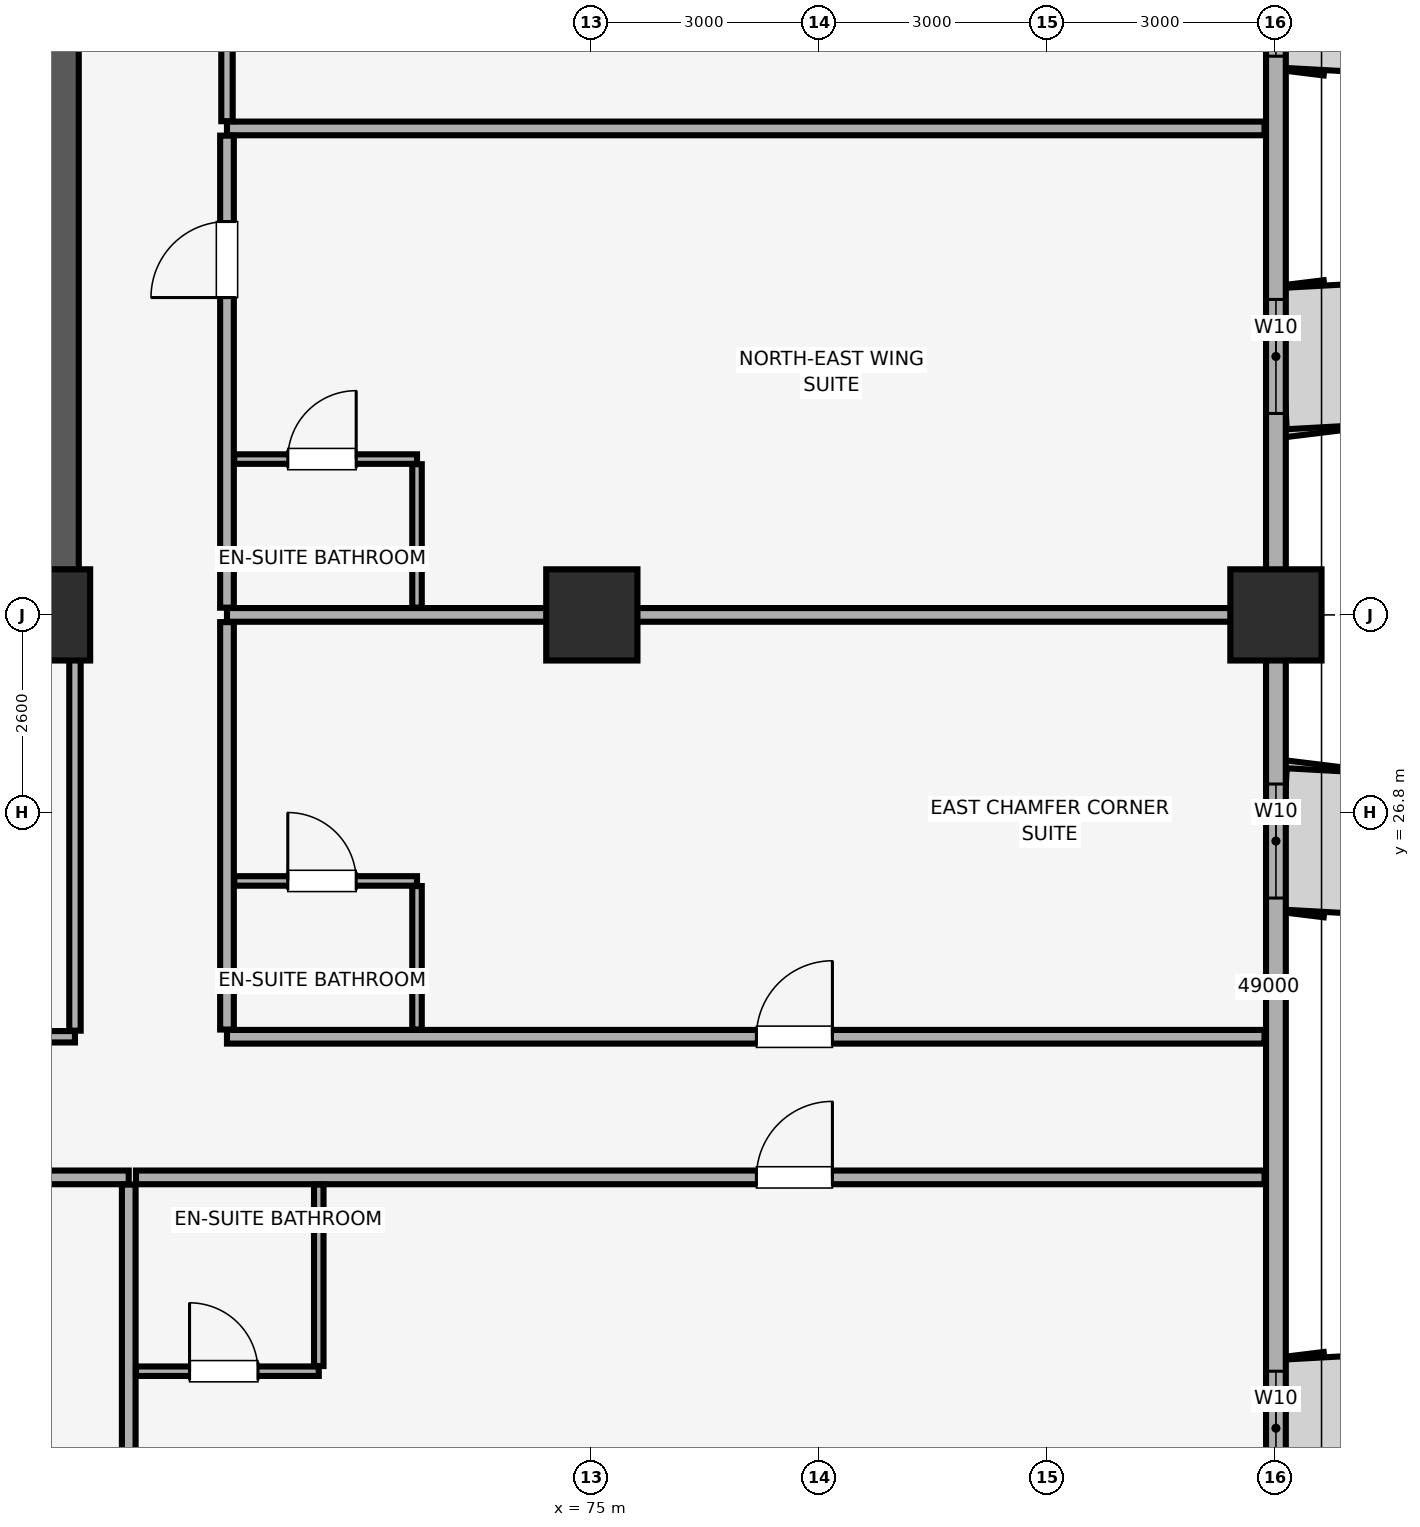
"""IFC4 building model, lengths in metres.
Left out: names, types, materials, properties, quantities, classifications, styles, units other than length and angle.
Written with IfcOpenShell. Run it as: python <this file> out.ifc"""

import sys

from ifc_helpers import new_model, si_unit, direction, frame, frame_2d, origin, origin_2d, place, context, subcontext, project, spatial, rectangle, extrude, element, fill, save


model = new_model("IFC4")
c1 = context("Model", 3, precision=1e-05, world=origin(), true_north=direction((0.0, 1.0)))
c2 = subcontext(c1, "Body", "Model", "MODEL_VIEW")
j1 = project(units=[si_unit("LENGTHUNIT", "METRE"), si_unit("PLANEANGLEUNIT", "RADIAN")], contexts=[c1])
p1 = place(None, origin())
s1 = spatial("IfcSite", under=j1, at=p1, CompositionType="ELEMENT")
p2 = place(p1, origin())
s2 = spatial("IfcBuilding", under=s1, at=p2, CompositionType="ELEMENT")
p3 = place(p2, frame((0.0, 0.0, 104.3)))
s3 = spatial("IfcBuildingStorey", under=s2, at=p3, CompositionType="ELEMENT", Elevation=104.3)
for number, where, z_axis, x_axis in (
    (1, (84.0, 29.4, 0.0), (0.0, 0.0, 1.0), (1.0, 0.0, 0.0)),
    (2, (67.8, 29.4, 0.0), (0.0, 0.0, 1.0), (1.0, 0.0, 0.0)),
    (3, (75.0, 29.4, 0.0), (0.0, 0.0, 1.0), (1.0, 0.0, 0.0)),
):
    element("IfcColumn", number, at=place(p3, frame(where, z_axis=z_axis, x_axis=x_axis)), inside=s3, PredefinedType="COLUMN", context=c2, shape_type="SweptSolid", body=[
        extrude(rectangle(XDim=1.2, YDim=1.2, at=origin_2d()), origin(), (0.0, 0.0, 1.0), 3.51),
    ])
p4 = place(p3, frame((84.0, 4.2, 0.0), z_axis=(0.0, 0.0, 1.0), x_axis=(0.0, 1.0, 0.0)))
e4 = element("IfcWall", 4, at=p4, inside=s3, PredefinedType="SOLIDWALL", context=c2, shape_type="SweptSolid", body=[
    extrude(rectangle(XDim=40.6, YDim=0.26, at=frame_2d((20.3, 0.0))), origin(), (0.0, 0.0, 1.0), 2.56),
])
p5 = place(p4, frame((6.05, 0.0, 0.85)))
e5 = element("IfcOpeningElement", 5, at=p5, cuts=e4, PredefinedType="OPENING", context=c2, shape_type="SweptSolid", body=[
    extrude(rectangle(XDim=1.5, YDim=1.4, at=frame_2d((0.75, 0.7))), frame((0.0, 0.14, 0.0), z_axis=(0.0, -1.0, 0.0), x_axis=(1.0, 0.0, 0.0)), (0.0, 0.0, 1.0), 0.28),
])
p6 = place(p4, frame((13.75, 0.0, 0.85)))
e6 = element("IfcOpeningElement", 6, at=p6, cuts=e4, PredefinedType="OPENING", context=c2, shape_type="SweptSolid", body=[
    extrude(rectangle(XDim=1.5, YDim=1.4, at=frame_2d((0.75, 0.7))), frame((0.0, 0.14, 0.0), z_axis=(0.0, -1.0, 0.0), x_axis=(1.0, 0.0, 0.0)), (0.0, 0.0, 1.0), 0.28),
])
p7 = place(p4, frame((21.475, 0.0, 0.85)))
e7 = element("IfcOpeningElement", 7, at=p7, cuts=e4, PredefinedType="OPENING", context=c2, shape_type="SweptSolid", body=[
    extrude(rectangle(XDim=1.5, YDim=1.4, at=frame_2d((0.75, 0.7))), frame((0.0, 0.14, 0.0), z_axis=(0.0, -1.0, 0.0), x_axis=(1.0, 0.0, 0.0)), (0.0, 0.0, 1.0), 0.28),
])
p8 = place(p4, frame((27.85, 0.0, 0.85)))
e8 = element("IfcOpeningElement", 8, at=p8, cuts=e4, PredefinedType="OPENING", context=c2, shape_type="SweptSolid", body=[
    extrude(rectangle(XDim=1.5, YDim=1.4, at=frame_2d((0.75, 0.7))), frame((0.0, 0.14, 0.0), z_axis=(0.0, -1.0, 0.0), x_axis=(1.0, 0.0, 0.0)), (0.0, 0.0, 1.0), 0.28),
])
p9 = place(p4, frame((32.55, 0.0, 0.85)))
e9 = element("IfcOpeningElement", 9, at=p9, cuts=e4, PredefinedType="OPENING", context=c2, shape_type="SweptSolid", body=[
    extrude(rectangle(XDim=1.5, YDim=1.4, at=frame_2d((0.75, 0.7))), frame((0.0, 0.14, 0.0), z_axis=(0.0, -1.0, 0.0), x_axis=(1.0, 0.0, 0.0)), (0.0, 0.0, 1.0), 0.28),
])
p10 = place(p4, frame((37.365, 0.0, 0.85)))
e10 = element("IfcOpeningElement", 10, at=p10, cuts=e4, PredefinedType="OPENING", context=c2, shape_type="SweptSolid", body=[
    extrude(rectangle(XDim=1.5, YDim=1.4, at=frame_2d((0.75, 0.7))), frame((0.0, 0.14, 0.0), z_axis=(0.0, -1.0, 0.0), x_axis=(1.0, 0.0, 0.0)), (0.0, 0.0, 1.0), 0.28),
])
p11 = place(p3, frame((67.8, 29.4, 0.0), z_axis=(0.0, 0.0, 1.0), x_axis=(0.0, 1.0, 0.0)))
e11 = element("IfcWall", 11, at=p11, inside=s3, PredefinedType="SHEAR", context=c2, shape_type="SweptSolid", body=[
    extrude(rectangle(XDim=19.2, YDim=0.9, at=frame_2d((9.6, 0.0))), origin(), (0.0, 0.0, 1.0), 3.51),
])
p12 = place(p3, frame((58.26, 22.0, 0.0), z_axis=(0.0, 0.0, 1.0), x_axis=(1.0, 0.0, 0.0)))
e12 = element("IfcWall", 12, at=p12, inside=s3, PredefinedType="PARTITIONING", context=c2, shape_type="SweptSolid", body=[
    extrude(rectangle(XDim=10.648, YDim=0.18, at=frame_2d((5.324, 0.0))), origin(), (0.0, 0.0, 1.0), 3.51),
])
p13 = place(p12, frame((5.533, 0.0, 0.0)))
e13 = element("IfcOpeningElement", 13, at=p13, cuts=e12, PredefinedType="OPENING", context=c2, shape_type="SweptSolid", body=[
    extrude(rectangle(XDim=1.0, YDim=2.15, at=frame_2d((0.5, 1.075))), frame((0.0, 0.1, 0.0), z_axis=(0.0, -1.0, 0.0), x_axis=(1.0, 0.0, 0.0)), (0.0, 0.0, 1.0), 0.2),
])
p14 = place(p3, frame((68.907, 0.15, 0.0), z_axis=(0.0, 0.0, 1.0), x_axis=(0.0, 1.0, 0.0)))
e14 = element("IfcWall", 14, at=p14, inside=s3, PredefinedType="PARTITIONING", context=c2, shape_type="SweptSolid", body=[
    extrude(rectangle(XDim=21.755, YDim=0.18, at=frame_2d((10.877, 0.0))), origin(), (0.0, 0.0, 1.0), 3.51),
])
p15 = place(p3, frame((69.002, 22.0, 0.0), z_axis=(0.0, 0.0, 1.0), x_axis=(1.0, 0.0, 0.0)))
e15 = element("IfcWall", 15, at=p15, inside=s3, PredefinedType="PARTITIONING", context=c2, shape_type="SweptSolid", body=[
    extrude(rectangle(XDim=14.848, YDim=0.18, at=frame_2d((7.424, 0.0))), origin(), (0.0, 0.0, 1.0), 3.51),
])
p16 = place(p15, frame((8.163, 0.0, 0.0)))
e16 = element("IfcOpeningElement", 16, at=p16, cuts=e15, PredefinedType="OPENING", context=c2, shape_type="SweptSolid", body=[
    extrude(rectangle(XDim=1.0, YDim=2.15, at=frame_2d((0.5, 1.075))), frame((0.0, 0.1, 0.0), z_axis=(0.0, -1.0, 0.0), x_axis=(1.0, 0.0, 0.0)), (0.0, 0.0, 1.0), 0.2),
])
p17 = place(p3, frame((69.002, 19.45, 0.0), z_axis=(0.0, 0.0, 1.0), x_axis=(1.0, 0.0, 0.0)))
e17 = element("IfcWall", 17, at=p17, inside=s3, PredefinedType="PARTITIONING", context=c2, shape_type="SweptSolid", body=[
    extrude(rectangle(XDim=2.405, YDim=0.125, at=frame_2d((1.203, 0.0))), origin(), (0.0, 0.0, 1.0), 3.51),
])
p18 = place(p17, frame((0.705, 0.0, 0.0)))
e18 = element("IfcOpeningElement", 18, at=p18, cuts=e17, PredefinedType="OPENING", context=c2, shape_type="SweptSolid", body=[
    extrude(rectangle(XDim=0.9, YDim=2.1, at=frame_2d((0.45, 1.05))), frame((0.0, 0.073, 0.0), z_axis=(0.0, -1.0, 0.0), x_axis=(1.0, 0.0, 0.0)), (0.0, 0.0, 1.0), 0.145),
])
p19 = place(p3, frame((71.407, 19.518, 0.0), z_axis=(0.0, 0.0, 1.0), x_axis=(0.0, 1.0, 0.0)))
e19 = element("IfcWall", 19, at=p19, inside=s3, PredefinedType="PARTITIONING", context=c2, shape_type="SweptSolid", body=[
    extrude(rectangle(XDim=2.387, YDim=0.125, at=frame_2d((1.194, 0.0))), origin(), (0.0, 0.0, 1.0), 2.977),
])
p20 = place(p3, frame((57.88, 23.85, 0.0), z_axis=(0.0, 0.0, 1.0), x_axis=(1.0, 0.0, 0.0)))
e20 = element("IfcWall", 20, at=p20, inside=s3, PredefinedType="PARTITIONING", context=c2, shape_type="SweptSolid", body=[
    extrude(rectangle(XDim=10.32, YDim=0.15, at=frame_2d((5.16, 0.0))), origin(), (0.0, 0.0, 1.0), 3.51),
])
p21 = place(p20, frame((4.62, 0.0, 0.0)))
e21 = element("IfcOpeningElement", 21, at=p21, cuts=e20, PredefinedType="OPENING", context=c2, shape_type="SweptSolid", body=[
    extrude(rectangle(XDim=1.0, YDim=2.15, at=frame_2d((0.5, 1.075))), frame((0.0, 0.085, 0.0), z_axis=(0.0, -1.0, 0.0), x_axis=(1.0, 0.0, 0.0)), (0.0, 0.0, 1.0), 0.17),
])
p22 = place(p3, frame((68.2, 23.93, 0.0), z_axis=(0.0, 0.0, 1.0), x_axis=(0.0, 1.0, 0.0)))
e22 = element("IfcWall", 22, at=p22, inside=s3, PredefinedType="PARTITIONING", context=c2, shape_type="SweptSolid", body=[
    extrude(rectangle(XDim=5.46, YDim=0.15, at=frame_2d((2.73, 0.0))), origin(), (0.0, 0.0, 1.0), 3.51),
])
p23 = place(p3, frame((70.2, 23.85, 0.0), z_axis=(0.0, 0.0, 1.0), x_axis=(1.0, 0.0, 0.0)))
e23 = element("IfcWall", 23, at=p23, inside=s3, PredefinedType="PARTITIONING", context=c2, shape_type="SweptSolid", body=[
    extrude(rectangle(XDim=13.65, YDim=0.18, at=frame_2d((6.825, 0.0))), origin(), (0.0, 0.0, 1.0), 3.51),
])
p24 = place(p23, frame((6.965, 0.0, 0.0)))
e24 = element("IfcOpeningElement", 24, at=p24, cuts=e23, PredefinedType="OPENING", context=c2, shape_type="SweptSolid", body=[
    extrude(rectangle(XDim=1.0, YDim=2.15, at=frame_2d((0.5, 1.075))), frame((0.0, 0.1, 0.0), z_axis=(0.0, -1.0, 0.0), x_axis=(1.0, 0.0, 0.0)), (0.0, 0.0, 1.0), 0.2),
])
p25 = place(p3, frame((70.2, 29.4, 0.0), z_axis=(0.0, 0.0, 1.0), x_axis=(1.0, 0.0, 0.0)))
e25 = element("IfcWall", 25, at=p25, inside=s3, PredefinedType="PARTITIONING", context=c2, shape_type="SweptSolid", body=[
    extrude(rectangle(XDim=13.65, YDim=0.18, at=frame_2d((6.825, 0.0))), origin(), (0.0, 0.0, 1.0), 2.86),
])
p26 = place(p3, frame((70.2, 23.945, 0.0), z_axis=(0.0, 0.0, 1.0), x_axis=(0.0, 1.0, 0.0)))
e26 = element("IfcWall", 26, at=p26, inside=s3, PredefinedType="PARTITIONING", context=c2, shape_type="SweptSolid", body=[
    extrude(rectangle(XDim=5.36, YDim=0.18, at=frame_2d((2.68, 0.0))), origin(), (0.0, 0.0, 1.0), 3.51),
])
p27 = place(p3, frame((70.295, 25.9, 0.0), z_axis=(0.0, 0.0, 1.0), x_axis=(1.0, 0.0, 0.0)))
e27 = element("IfcWall", 27, at=p27, inside=s3, PredefinedType="PARTITIONING", context=c2, shape_type="SweptSolid", body=[
    extrude(rectangle(XDim=2.405, YDim=0.125, at=frame_2d((1.203, 0.0))), origin(), (0.0, 0.0, 1.0), 3.51),
])
p28 = place(p27, frame((0.705, 0.0, 0.0)))
e28 = element("IfcOpeningElement", 28, at=p28, cuts=e27, PredefinedType="OPENING", context=c2, shape_type="SweptSolid", body=[
    extrude(rectangle(XDim=0.9, YDim=2.1, at=frame_2d((0.45, 1.05))), frame((0.0, 0.073, 0.0), z_axis=(0.0, -1.0, 0.0), x_axis=(1.0, 0.0, 0.0)), (0.0, 0.0, 1.0), 0.145),
])
p29 = place(p3, frame((72.7, 23.945, 0.0), z_axis=(0.0, 0.0, 1.0), x_axis=(0.0, 1.0, 0.0)))
e29 = element("IfcWall", 29, at=p29, inside=s3, PredefinedType="PARTITIONING", context=c2, shape_type="SweptSolid", body=[
    extrude(rectangle(XDim=1.887, YDim=0.125, at=frame_2d((0.944, 0.0))), origin(), (0.0, 0.0, 1.0), 3.51),
])
p30 = place(p3, frame((70.2, 35.8, 0.0), z_axis=(0.0, 0.0, 1.0), x_axis=(1.0, 0.0, 0.0)))
e30 = element("IfcWall", 30, at=p30, inside=s3, PredefinedType="PARTITIONING", context=c2, shape_type="SweptSolid", body=[
    extrude(rectangle(XDim=13.65, YDim=0.18, at=frame_2d((6.825, 0.0))), origin(), (0.0, 0.0, 1.0), 3.51),
])
p31 = place(p3, frame((70.2, 29.495, 0.0), z_axis=(0.0, 0.0, 1.0), x_axis=(0.0, 1.0, 0.0)))
e31 = element("IfcWall", 31, at=p31, inside=s3, PredefinedType="PARTITIONING", context=c2, shape_type="SweptSolid", body=[
    extrude(rectangle(XDim=6.21, YDim=0.18, at=frame_2d((3.105, 0.0))), origin(), (0.0, 0.0, 1.0), 3.51),
])
p32 = place(p31, frame((4.08, 0.0, 0.0)))
e32 = element("IfcOpeningElement", 32, at=p32, cuts=e31, PredefinedType="OPENING", context=c2, shape_type="SweptSolid", body=[
    extrude(rectangle(XDim=1.0, YDim=2.15, at=frame_2d((0.5, 1.075))), frame((0.0, 0.1, 0.0), z_axis=(0.0, -1.0, 0.0), x_axis=(1.0, 0.0, 0.0)), (0.0, 0.0, 1.0), 0.2),
])
p33 = place(p3, frame((70.295, 31.45, 0.0), z_axis=(0.0, 0.0, 1.0), x_axis=(1.0, 0.0, 0.0)))
e33 = element("IfcWall", 33, at=p33, inside=s3, PredefinedType="PARTITIONING", context=c2, shape_type="SweptSolid", body=[
    extrude(rectangle(XDim=2.405, YDim=0.125, at=frame_2d((1.203, 0.0))), origin(), (0.0, 0.0, 1.0), 3.51),
])
p34 = place(p33, frame((0.705, 0.0, 0.0)))
e34 = element("IfcOpeningElement", 34, at=p34, cuts=e33, PredefinedType="OPENING", context=c2, shape_type="SweptSolid", body=[
    extrude(rectangle(XDim=0.9, YDim=2.1, at=frame_2d((0.45, 1.05))), frame((0.0, 0.073, 0.0), z_axis=(0.0, -1.0, 0.0), x_axis=(1.0, 0.0, 0.0)), (0.0, 0.0, 1.0), 0.145),
])
p35 = place(p3, frame((72.7, 29.495, 0.0), z_axis=(0.0, 0.0, 1.0), x_axis=(0.0, 1.0, 0.0)))
e35 = element("IfcWall", 35, at=p35, inside=s3, PredefinedType="PARTITIONING", context=c2, shape_type="SweptSolid", body=[
    extrude(rectangle(XDim=1.887, YDim=0.125, at=frame_2d((0.944, 0.0))), origin(), (0.0, 0.0, 1.0), 3.51),
])
p36 = place(p3, frame((70.2, 35.895, 0.0), z_axis=(0.0, 0.0, 1.0), x_axis=(0.0, 1.0, 0.0)))
e36 = element("IfcWall", 36, at=p36, inside=s3, PredefinedType="PARTITIONING", context=c2, shape_type="SweptSolid", body=[
    extrude(rectangle(XDim=12.955, YDim=0.15, at=frame_2d((6.478, 0.0))), origin(), (0.0, 0.0, 1.0), 3.51),
])
p37 = place(p36, frame((4.605, 0.0, 0.0)))
e37 = element("IfcOpeningElement", 37, at=p37, cuts=e36, PredefinedType="OPENING", context=c2, shape_type="SweptSolid", body=[
    extrude(rectangle(XDim=1.0, YDim=2.15, at=frame_2d((0.5, 1.075))), frame((0.0, 0.085, 0.0), z_axis=(0.0, -1.0, 0.0), x_axis=(1.0, 0.0, 0.0)), (0.0, 0.0, 1.0), 0.17),
])
p38 = place(p6, origin())
e38 = element("IfcWindow", 38, at=p38, inside=s3, PartitioningType="SINGLE_PANEL", PredefinedType="WINDOW", context=c2, shape_type="SweptSolid", body=[
    extrude(rectangle(XDim=1.5, YDim=1.4, at=frame_2d((0.75, 0.7))), frame((0.0, 0.03, 0.0), z_axis=(0.0, -1.0, 0.0), x_axis=(1.0, 0.0, 0.0)), (0.0, 0.0, 1.0), 0.06),
])
fill(e6, e38)
p39 = place(p7, origin())
e39 = element("IfcWindow", 39, at=p39, inside=s3, PartitioningType="SINGLE_PANEL", PredefinedType="WINDOW", context=c2, shape_type="SweptSolid", body=[
    extrude(rectangle(XDim=1.5, YDim=1.4, at=frame_2d((0.75, 0.7))), frame((0.0, 0.03, 0.0), z_axis=(0.0, -1.0, 0.0), x_axis=(1.0, 0.0, 0.0)), (0.0, 0.0, 1.0), 0.06),
])
fill(e7, e39)
p40 = place(p8, origin())
e40 = element("IfcWindow", 40, at=p40, inside=s3, PartitioningType="SINGLE_PANEL", PredefinedType="WINDOW", context=c2, shape_type="SweptSolid", body=[
    extrude(rectangle(XDim=1.5, YDim=1.4, at=frame_2d((0.75, 0.7))), frame((0.0, 0.03, 0.0), z_axis=(0.0, -1.0, 0.0), x_axis=(1.0, 0.0, 0.0)), (0.0, 0.0, 1.0), 0.06),
])
fill(e8, e40)
p41 = place(p9, origin())
e41 = element("IfcWindow", 41, at=p41, inside=s3, PartitioningType="SINGLE_PANEL", PredefinedType="WINDOW", context=c2, shape_type="SweptSolid", body=[
    extrude(rectangle(XDim=1.5, YDim=1.4, at=frame_2d((0.75, 0.7))), frame((0.0, 0.03, 0.0), z_axis=(0.0, -1.0, 0.0), x_axis=(1.0, 0.0, 0.0)), (0.0, 0.0, 1.0), 0.06),
])
fill(e9, e41)
p42 = place(p16, origin())
e42 = element("IfcDoor", 42, at=p42, inside=s3, OperationType="SINGLE_SWING_RIGHT", PredefinedType="DOOR", context=c2, shape_type="SweptSolid", body=[
    extrude(rectangle(XDim=1.0, YDim=2.15, at=frame_2d((0.5, 1.075))), frame((0.0, 0.025, 0.0), z_axis=(0.0, -1.0, 0.0), x_axis=(1.0, 0.0, 0.0)), (0.0, 0.0, 1.0), 0.05),
])
fill(e16, e42)
p43 = place(p18, origin())
e43 = element("IfcDoor", 43, at=p43, inside=s3, OperationType="SINGLE_SWING_LEFT", PredefinedType="DOOR", context=c2, shape_type="SweptSolid", body=[
    extrude(rectangle(XDim=0.9, YDim=2.1, at=frame_2d((0.45, 1.05))), frame((0.0, 0.025, 0.0), z_axis=(0.0, -1.0, 0.0), x_axis=(1.0, 0.0, 0.0)), (0.0, 0.0, 1.0), 0.05),
])
fill(e18, e43)
p44 = place(p24, origin())
e44 = element("IfcDoor", 44, at=p44, inside=s3, OperationType="SINGLE_SWING_RIGHT", PredefinedType="DOOR", context=c2, shape_type="SweptSolid", body=[
    extrude(rectangle(XDim=1.0, YDim=2.15, at=frame_2d((0.5, 1.075))), frame((0.0, 0.025, 0.0), z_axis=(0.0, -1.0, 0.0), x_axis=(1.0, 0.0, 0.0)), (0.0, 0.0, 1.0), 0.05),
])
fill(e24, e44)
p45 = place(p28, origin())
e45 = element("IfcDoor", 45, at=p45, inside=s3, OperationType="SINGLE_SWING_LEFT", PredefinedType="DOOR", context=c2, shape_type="SweptSolid", body=[
    extrude(rectangle(XDim=0.9, YDim=2.1, at=frame_2d((0.45, 1.05))), frame((0.0, 0.025, 0.0), z_axis=(0.0, -1.0, 0.0), x_axis=(1.0, 0.0, 0.0)), (0.0, 0.0, 1.0), 0.05),
])
fill(e28, e45)
p46 = place(p32, origin())
e46 = element("IfcDoor", 46, at=p46, inside=s3, OperationType="SINGLE_SWING_LEFT", PredefinedType="DOOR", context=c2, shape_type="SweptSolid", body=[
    extrude(rectangle(XDim=1.0, YDim=2.15, at=frame_2d((0.5, 1.075))), frame((0.0, 0.025, 0.0), z_axis=(0.0, -1.0, 0.0), x_axis=(1.0, 0.0, 0.0)), (0.0, 0.0, 1.0), 0.05),
])
fill(e32, e46)
p47 = place(p34, origin())
e47 = element("IfcDoor", 47, at=p47, inside=s3, OperationType="SINGLE_SWING_RIGHT", PredefinedType="DOOR", context=c2, shape_type="SweptSolid", body=[
    extrude(rectangle(XDim=0.9, YDim=2.1, at=frame_2d((0.45, 1.05))), frame((0.0, 0.025, 0.0), z_axis=(0.0, -1.0, 0.0), x_axis=(1.0, 0.0, 0.0)), (0.0, 0.0, 1.0), 0.05),
])
fill(e34, e47)
save(model, sys.argv[1])
